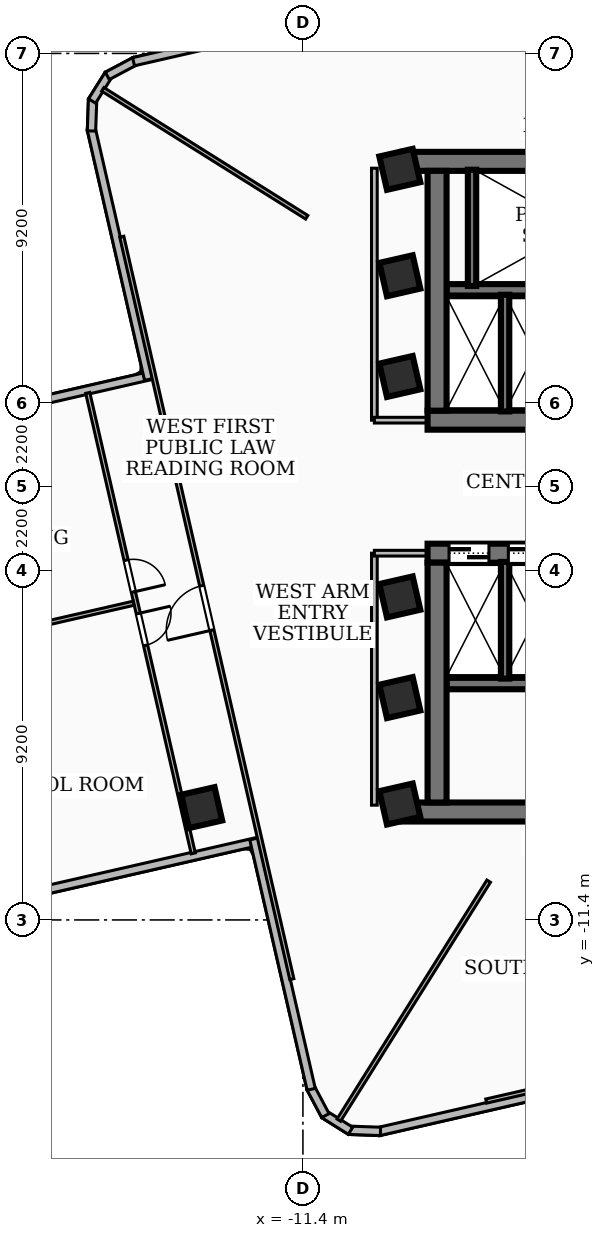
"""IFC4 building model, lengths in metres.
Left out: names, types, materials, properties, quantities, classifications, styles, units other than length and angle.
Written with IfcOpenShell. Run it as: python <this file> out.ifc"""

import sys

from ifc_helpers import new_model, si_unit, direction, frame, frame_2d, origin, origin_2d, place, context, subcontext, project, spatial, rectangle, extrude, element, fill, save


model = new_model("IFC4")
c1 = context("Model", 3, precision=1e-05, world=origin(), true_north=direction((0.0, 1.0)))
c2 = subcontext(c1, "Body", "Model", "MODEL_VIEW")
j1 = project(units=[si_unit("LENGTHUNIT", "METRE"), si_unit("PLANEANGLEUNIT", "RADIAN")], contexts=[c1])
p1 = place(None, origin())
s1 = spatial("IfcSite", under=j1, at=p1, CompositionType="ELEMENT")
p2 = place(p1, origin())
s2 = spatial("IfcBuilding", under=s1, at=p2, CompositionType="ELEMENT")
p3 = place(p2, frame((0.0, 0.0, 119.88)))
s3 = spatial("IfcBuildingStorey", under=s2, at=p3, CompositionType="ELEMENT", Elevation=119.88)
p4 = place(p3, frame((-8.78, 8.56, 0.0), z_axis=(0.0, 0.0, 1.0), x_axis=(1.0, 0.0, 0.0)))
e1 = element("IfcWall", 1, at=p4, inside=s3, PredefinedType="SHEAR", context=c2, shape_type="SweptSolid", body=[
    extrude(rectangle(XDim=17.56, YDim=0.5, at=frame_2d((8.78, 0.0))), origin(), (0.0, 0.0, 1.0), 3.34),
])
p5 = place(p3, frame((8.12, 1.75, 0.0), z_axis=(0.0, 0.0, 1.0), x_axis=(-1.0, 0.0, 0.0)))
e2 = element("IfcWall", 2, at=p5, inside=s3, PredefinedType="SHEAR", context=c2, shape_type="SweptSolid", body=[
    extrude(rectangle(XDim=16.24, YDim=0.5, at=frame_2d((8.12, 0.0))), origin(), (0.0, 0.0, 1.0), 3.34),
])
p6 = place(p5, frame((7.45, 0.0, 0.0)))
e3 = element("IfcOpeningElement", 3, at=p6, cuts=e2, PredefinedType="OPENING", context=c2, shape_type="SweptSolid", body=[
    extrude(rectangle(XDim=1.0, YDim=2.1, at=frame_2d((0.5, 1.05))), frame((0.0, 0.26, 0.0), z_axis=(0.0, -1.0, 0.0), x_axis=(1.0, 0.0, 0.0)), (0.0, 0.0, 1.0), 0.52),
])
p7 = place(p5, frame((3.4, 0.0, 0.0)))
e4 = element("IfcOpeningElement", 4, at=p7, cuts=e2, PredefinedType="OPENING", context=c2, shape_type="SweptSolid", body=[
    extrude(rectangle(XDim=0.9, YDim=2.06, at=frame_2d((0.45, 1.03))), frame((0.0, 0.26, 0.0), z_axis=(0.0, -1.0, 0.0), x_axis=(1.0, 0.0, 0.0)), (0.0, 0.0, 1.0), 0.52),
])
p8 = place(p5, frame((1.1, 0.0, 0.0)))
e5 = element("IfcOpeningElement", 5, at=p8, cuts=e2, PredefinedType="OPENING", context=c2, shape_type="SweptSolid", body=[
    extrude(rectangle(XDim=0.9, YDim=2.06, at=frame_2d((0.45, 1.03))), frame((0.0, 0.26, 0.0), z_axis=(0.0, -1.0, 0.0), x_axis=(1.0, 0.0, 0.0)), (0.0, 0.0, 1.0), 0.52),
])
p9 = place(p3, frame((-7.87, 2.0, 0.0), z_axis=(0.0, 0.0, 1.0), x_axis=(0.0, 1.0, 0.0)))
e6 = element("IfcWall", 6, at=p9, inside=s3, PredefinedType="SHEAR", context=c2, shape_type="SweptSolid", body=[
    extrude(rectangle(XDim=6.31, YDim=0.5, at=frame_2d((3.155, 0.0))), origin(), (0.0, 0.0, 1.0), 3.34),
])
p10 = place(p3, frame((7.62, 5.18, 0.0), z_axis=(0.0, 0.0, 1.0), x_axis=(-1.0, 0.0, 0.0)))
e7 = element("IfcWall", 7, at=p10, inside=s3, PredefinedType="SOLIDWALL", context=c2, shape_type="SweptSolid", body=[
    extrude(rectangle(XDim=15.24, YDim=0.3, at=frame_2d((7.62, 0.0))), origin(), (0.0, 0.0, 1.0), 3.34),
])
p11 = place(p10, frame((5.77, 0.0, 0.0)))
e8 = element("IfcOpeningElement", 8, at=p11, cuts=e7, PredefinedType="OPENING", context=c2, shape_type="SweptSolid", body=[
    extrude(rectangle(XDim=1.1, YDim=2.15, at=frame_2d((0.55, 1.075))), frame((0.0, 0.16, 0.0), z_axis=(0.0, -1.0, 0.0), x_axis=(1.0, 0.0, 0.0)), (0.0, 0.0, 1.0), 0.32),
])
p12 = place(p10, frame((2.97, 0.0, 0.0)))
e9 = element("IfcOpeningElement", 9, at=p12, cuts=e7, PredefinedType="OPENING", context=c2, shape_type="SweptSolid", body=[
    extrude(rectangle(XDim=1.1, YDim=2.15, at=frame_2d((0.55, 1.075))), frame((0.0, 0.16, 0.0), z_axis=(0.0, -1.0, 0.0), x_axis=(1.0, 0.0, 0.0)), (0.0, 0.0, 1.0), 0.32),
])
p13 = place(p10, frame((7.97, 0.0, 0.0)))
e10 = element("IfcOpeningElement", 10, at=p13, cuts=e7, PredefinedType="OPENING", context=c2, shape_type="SweptSolid", body=[
    extrude(rectangle(XDim=1.0, YDim=2.1, at=frame_2d((0.5, 1.05))), frame((0.0, 0.16, 0.0), z_axis=(0.0, -1.0, 0.0), x_axis=(1.0, 0.0, 0.0)), (0.0, 0.0, 1.0), 0.32),
])
p14 = place(p3, frame((8.78, -8.56, 0.0), z_axis=(0.0, 0.0, 1.0), x_axis=(-1.0, 0.0, 0.0)))
e11 = element("IfcWall", 11, at=p14, inside=s3, PredefinedType="SHEAR", context=c2, shape_type="SweptSolid", body=[
    extrude(rectangle(XDim=17.56, YDim=0.5, at=frame_2d((8.78, 0.0))), origin(), (0.0, 0.0, 1.0), 3.34),
])
p15 = place(p3, frame((-8.12, -1.75, 0.0), z_axis=(0.0, 0.0, 1.0), x_axis=(1.0, 0.0, 0.0)))
e12 = element("IfcWall", 12, at=p15, inside=s3, PredefinedType="SHEAR", context=c2, shape_type="SweptSolid", body=[
    extrude(rectangle(XDim=16.24, YDim=0.5, at=frame_2d((8.12, 0.0))), origin(), (0.0, 0.0, 1.0), 3.34),
])
p16 = place(p15, frame((7.45, 0.0, 0.0)))
e13 = element("IfcOpeningElement", 13, at=p16, cuts=e12, PredefinedType="OPENING", context=c2, shape_type="SweptSolid", body=[
    extrude(rectangle(XDim=1.0, YDim=2.1, at=frame_2d((0.5, 1.05))), frame((0.0, 0.26, 0.0), z_axis=(0.0, -1.0, 0.0), x_axis=(1.0, 0.0, 0.0)), (0.0, 0.0, 1.0), 0.52),
])
p17 = place(p15, frame((12.65, 0.0, 0.0)))
e14 = element("IfcOpeningElement", 14, at=p17, cuts=e12, PredefinedType="OPENING", context=c2, shape_type="SweptSolid", body=[
    extrude(rectangle(XDim=0.9, YDim=2.06, at=frame_2d((0.45, 1.03))), frame((0.0, 0.26, 0.0), z_axis=(0.0, -1.0, 0.0), x_axis=(1.0, 0.0, 0.0)), (0.0, 0.0, 1.0), 0.52),
])
p18 = place(p15, frame((0.565, 0.0, 0.0)))
e15 = element("IfcOpeningElement", 15, at=p18, cuts=e12, PredefinedType="OPENING", context=c2, shape_type="SweptSolid", body=[
    extrude(rectangle(XDim=1.05, YDim=2.15, at=frame_2d((0.525, 1.075))), frame((0.0, 0.26, 0.0), z_axis=(0.0, -1.0, 0.0), x_axis=(1.0, 0.0, 0.0)), (0.0, 0.0, 1.0), 0.52),
])
p19 = place(p15, frame((2.125, 0.0, 0.0)))
e16 = element("IfcOpeningElement", 16, at=p19, cuts=e12, PredefinedType="OPENING", context=c2, shape_type="SweptSolid", body=[
    extrude(rectangle(XDim=1.05, YDim=2.15, at=frame_2d((0.525, 1.075))), frame((0.0, 0.26, 0.0), z_axis=(0.0, -1.0, 0.0), x_axis=(1.0, 0.0, 0.0)), (0.0, 0.0, 1.0), 0.52),
])
p20 = place(p15, frame((3.685, 0.0, 0.0)))
e17 = element("IfcOpeningElement", 17, at=p20, cuts=e12, PredefinedType="OPENING", context=c2, shape_type="SweptSolid", body=[
    extrude(rectangle(XDim=1.05, YDim=2.15, at=frame_2d((0.525, 1.075))), frame((0.0, 0.26, 0.0), z_axis=(0.0, -1.0, 0.0), x_axis=(1.0, 0.0, 0.0)), (0.0, 0.0, 1.0), 0.52),
])
p21 = place(p3, frame((-7.87, -8.31, 0.0), z_axis=(0.0, 0.0, 1.0), x_axis=(0.0, 1.0, 0.0)))
e18 = element("IfcWall", 18, at=p21, inside=s3, PredefinedType="SHEAR", context=c2, shape_type="SweptSolid", body=[
    extrude(rectangle(XDim=6.31, YDim=0.5, at=frame_2d((3.155, 0.0))), origin(), (0.0, 0.0, 1.0), 3.34),
])
p22 = place(p3, frame((-7.62, -5.18, 0.0), z_axis=(0.0, 0.0, 1.0), x_axis=(1.0, 0.0, 0.0)))
e19 = element("IfcWall", 19, at=p22, inside=s3, PredefinedType="SOLIDWALL", context=c2, shape_type="SweptSolid", body=[
    extrude(rectangle(XDim=15.24, YDim=0.3, at=frame_2d((7.62, 0.0))), origin(), (0.0, 0.0, 1.0), 3.34),
])
p23 = place(p22, frame((5.77, 0.0, 0.0)))
e20 = element("IfcOpeningElement", 20, at=p23, cuts=e19, PredefinedType="OPENING", context=c2, shape_type="SweptSolid", body=[
    extrude(rectangle(XDim=1.1, YDim=2.15, at=frame_2d((0.55, 1.075))), frame((0.0, 0.16, 0.0), z_axis=(0.0, -1.0, 0.0), x_axis=(1.0, 0.0, 0.0)), (0.0, 0.0, 1.0), 0.32),
])
p24 = place(p22, frame((7.97, 0.0, 0.0)))
e21 = element("IfcOpeningElement", 21, at=p24, cuts=e19, PredefinedType="OPENING", context=c2, shape_type="SweptSolid", body=[
    extrude(rectangle(XDim=1.0, YDim=2.1, at=frame_2d((0.5, 1.05))), frame((0.0, 0.16, 0.0), z_axis=(0.0, -1.0, 0.0), x_axis=(1.0, 0.0, 0.0)), (0.0, 0.0, 1.0), 0.32),
])
p25 = place(p3, frame((-6.95, 5.28, 0.0), z_axis=(0.0, 0.0, 1.0), x_axis=(0.0, 1.0, 0.0)))
e22 = element("IfcWall", 22, at=p25, inside=s3, PredefinedType="SOLIDWALL", context=c2, shape_type="SweptSolid", body=[
    extrude(rectangle(XDim=3.06, YDim=0.22, at=frame_2d((1.53, 0.0))), origin(), (0.0, 0.0, 1.0), 3.34),
])
for number, where, z_axis, x_axis in (
    (23, (-6.08, 1.98, 0.0), (0.0, 0.0, 1.0), (0.0, 1.0, 0.0)),
    (24, (-6.08, -5.05, 0.0), (0.0, 0.0, 1.0), (0.0, 1.0, 0.0)),
):
    element("IfcWall", number, at=place(p3, frame(where, z_axis=z_axis, x_axis=x_axis)), inside=s3, PredefinedType="SOLIDWALL", context=c2, shape_type="SweptSolid", body=[
        extrude(rectangle(XDim=3.07, YDim=0.22, at=frame_2d((1.535, 0.0))), origin(), (0.0, 0.0, 1.0), 3.34),
    ])
for number, where, z_axis, x_axis in (
    (25, (-8.85, -5.55, 0.0), (0.0, 0.0, 1.0), (0.975, 0.223, 0.0)),
    (26, (-8.85, -2.9, 0.0), (0.0, 0.0, 1.0), (0.975, 0.223, 0.0)),
    (27, (-8.85, 2.9, 0.0), (0.0, 0.0, 1.0), (0.975, 0.223, 0.0)),
    (28, (-8.85, 5.55, 0.0), (0.0, 0.0, 1.0), (0.975, 0.223, 0.0)),
    (29, (-8.85, 8.35, 0.0), (0.0, 0.0, 1.0), (0.975, 0.223, 0.0)),
    (30, (-8.85, -8.35, 0.0), (0.0, 0.0, 1.0), (0.975, 0.223, 0.0)),
    (31, (-14.064, -8.445, 0.0), (0.0, 0.0, 1.0), (0.975, 0.223, 0.0)),
):
    element("IfcColumn", number, at=place(p3, frame(where, z_axis=z_axis, x_axis=x_axis)), inside=s3, PredefinedType="COLUMN", context=c2, shape_type="SweptSolid", body=[
        extrude(rectangle(XDim=0.9, YDim=0.9, at=origin_2d()), origin(), (0.0, 0.0, 1.0), 3.6),
    ])
p26 = place(p3, frame((-12.585, -9.335, 0.0), z_axis=(0.0, 0.0, 1.0), x_axis=(-0.974754036658, -0.223281365141, 0.0)))
e32 = element("IfcWall", 32, at=p26, inside=s3, PredefinedType="SOLIDWALL", context=c2, shape_type="SweptSolid", body=[
    extrude(rectangle(XDim=13.459, YDim=0.22, at=frame_2d((6.729, 0.0))), origin(), (0.0, 0.0, 1.0), 3.34),
])
p27 = place(p26, frame((9.659, 0.0, 0.85)))
e33 = element("IfcOpeningElement", 33, at=p27, cuts=e32, PredefinedType="OPENING", context=c2, shape_type="SweptSolid", body=[
    extrude(rectangle(XDim=2.7, YDim=1.85, at=frame_2d((1.35, 0.925))), frame((0.0, 0.12, 0.0), z_axis=(0.0, -1.0, 0.0), x_axis=(1.0, 0.0, 0.0)), (0.0, 0.0, 1.0), 0.24),
])
p28 = place(p3, frame((-28.512, -0.078, 0.0), z_axis=(0.0, 0.0, 1.0), x_axis=(0.974753462872, 0.223283870038, 0.0)))
e34 = element("IfcWall", 34, at=p28, inside=s3, PredefinedType="SOLIDWALL", context=c2, shape_type="SweptSolid", body=[
    extrude(rectangle(XDim=13.458, YDim=0.22, at=frame_2d((6.729, 0.0))), origin(), (0.0, 0.0, 1.0), 3.34),
])
p29 = place(p28, frame((1.1, 0.0, 0.85)))
e35 = element("IfcOpeningElement", 35, at=p29, cuts=e34, PredefinedType="OPENING", context=c2, shape_type="SweptSolid", body=[
    extrude(rectangle(XDim=1.5, YDim=1.8, at=frame_2d((0.75, 0.9))), frame((0.0, 0.12, 0.0), z_axis=(0.0, -1.0, 0.0), x_axis=(1.0, 0.0, 0.0)), (0.0, 0.0, 1.0), 0.24),
])
p30 = place(p3, frame((-15.46, 2.821, 0.0), z_axis=(0.0, 0.0, 1.0), x_axis=(-0.223278912438, 0.974754598481, 0.0)))
e36 = element("IfcWall", 36, at=p30, inside=s3, PredefinedType="SOLIDWALL", context=c2, shape_type="SweptSolid", body=[
    extrude(rectangle(XDim=6.759, YDim=0.22, at=frame_2d((3.379, 0.0))), origin(), (0.0, 0.0, 1.0), 3.34),
])
p31 = place(p3, frame((-16.964, 9.36, 0.0), z_axis=(0.0, 0.0, 1.0), x_axis=(0.035983706773, 0.999352376715, 0.0)))
e37 = element("IfcWall", 37, at=p31, inside=s3, PredefinedType="SOLIDWALL", context=c2, shape_type="SweptSolid", body=[
    extrude(rectangle(XDim=0.834, YDim=0.22, at=frame_2d((0.417, 0.0))), origin(), (0.0, 0.0, 1.0), 3.34),
])
p32 = place(p3, frame((-16.948, 10.148, 0.0), z_axis=(0.0, 0.0, 1.0), x_axis=(0.531096868492, 0.847311109497, 0.0)))
e38 = element("IfcWall", 38, at=p32, inside=s3, PredefinedType="SOLIDWALL", context=c2, shape_type="SweptSolid", body=[
    extrude(rectangle(XDim=0.819, YDim=0.22, at=frame_2d((0.41, 0.0))), origin(), (0.0, 0.0, 1.0), 3.34),
])
p33 = place(p3, frame((-16.548, 10.809, 0.0), z_axis=(0.0, 0.0, 1.0), x_axis=(0.883460266876, 0.468506090516, 0.0)))
e39 = element("IfcWall", 39, at=p33, inside=s3, PredefinedType="SOLIDWALL", context=c2, shape_type="SweptSolid", body=[
    extrude(rectangle(XDim=0.834, YDim=0.22, at=frame_2d((0.417, 0.0))), origin(), (0.0, 0.0, 1.0), 3.34),
])
p34 = place(p3, frame((-15.857, 11.182, 0.0), z_axis=(0.0, 0.0, 1.0), x_axis=(0.974754598481, 0.223278912438, 0.0)))
e40 = element("IfcWall", 40, at=p34, inside=s3, PredefinedType="SOLIDWALL", context=c2, shape_type="SweptSolid", body=[
    extrude(rectangle(XDim=6.759, YDim=0.22, at=frame_2d((3.379, 0.0))), origin(), (0.0, 0.0, 1.0), 3.34),
])
p35 = place(p3, frame((-2.821, -15.46, 0.0), z_axis=(0.0, 0.0, 1.0), x_axis=(-0.974754598481, -0.223278912438, 0.0)))
e41 = element("IfcWall", 41, at=p35, inside=s3, PredefinedType="SOLIDWALL", context=c2, shape_type="SweptSolid", body=[
    extrude(rectangle(XDim=6.759, YDim=0.22, at=frame_2d((3.379, 0.0))), origin(), (0.0, 0.0, 1.0), 2.57),
])
p36 = place(p3, frame((-9.36, -16.964, 0.0), z_axis=(0.0, 0.0, 1.0), x_axis=(-0.999352376715, 0.035983706773, 0.0)))
e42 = element("IfcWall", 42, at=p36, inside=s3, PredefinedType="SOLIDWALL", context=c2, shape_type="SweptSolid", body=[
    extrude(rectangle(XDim=0.834, YDim=0.22, at=frame_2d((0.417, 0.0))), origin(), (0.0, 0.0, 1.0), 3.34),
])
p37 = place(p3, frame((-10.148, -16.948, 0.0), z_axis=(0.0, 0.0, 1.0), x_axis=(-0.847311109497, 0.531096868492, 0.0)))
e43 = element("IfcWall", 43, at=p37, inside=s3, PredefinedType="SOLIDWALL", context=c2, shape_type="SweptSolid", body=[
    extrude(rectangle(XDim=0.819, YDim=0.22, at=frame_2d((0.41, 0.0))), origin(), (0.0, 0.0, 1.0), 3.34),
])
p38 = place(p3, frame((-10.809, -16.548, 0.0), z_axis=(0.0, 0.0, 1.0), x_axis=(-0.468506090516, 0.883460266876, 0.0)))
e44 = element("IfcWall", 44, at=p38, inside=s3, PredefinedType="SOLIDWALL", context=c2, shape_type="SweptSolid", body=[
    extrude(rectangle(XDim=0.834, YDim=0.22, at=frame_2d((0.417, 0.0))), origin(), (0.0, 0.0, 1.0), 3.34),
])
p39 = place(p3, frame((-11.182, -15.857, 0.0), z_axis=(0.0, 0.0, 1.0), x_axis=(-0.223278912438, 0.974754598481, 0.0)))
e45 = element("IfcWall", 45, at=p39, inside=s3, PredefinedType="SOLIDWALL", context=c2, shape_type="SweptSolid", body=[
    extrude(rectangle(XDim=6.759, YDim=0.22, at=frame_2d((3.379, 0.0))), origin(), (0.0, 0.0, 1.0), 3.34),
])
p40 = place(p3, frame((-9.52, 1.75, 0.0), z_axis=(0.0, 0.0, 1.0), x_axis=(0.0, 1.0, 0.0)))
e46 = element("IfcWall", 46, at=p40, inside=s3, PredefinedType="PARTITIONING", context=c2, shape_type="SweptSolid", body=[
    extrude(rectangle(XDim=6.63, YDim=0.15, at=frame_2d((3.315, 0.0))), origin(), (0.0, 0.0, 1.0), 2.57),
])
p41 = place(p3, frame((-7.85, 1.75, 0.0), z_axis=(0.0, 0.0, 1.0), x_axis=(-1.0, 0.0, 0.0)))
e47 = element("IfcWall", 47, at=p41, inside=s3, PredefinedType="PARTITIONING", context=c2, shape_type="SweptSolid", body=[
    extrude(rectangle(XDim=1.67, YDim=0.15, at=frame_2d((0.835, 0.0))), origin(), (0.0, 0.0, 1.0), 2.57),
])
p42 = place(p3, frame((-9.52, -8.38, 0.0), z_axis=(0.0, 0.0, 1.0), x_axis=(0.0, 1.0, 0.0)))
e48 = element("IfcWall", 48, at=p42, inside=s3, PredefinedType="PARTITIONING", context=c2, shape_type="SweptSolid", body=[
    extrude(rectangle(XDim=6.63, YDim=0.15, at=frame_2d((3.315, 0.0))), origin(), (0.0, 0.0, 1.0), 2.57),
])
p43 = place(p3, frame((-7.85, -1.75, 0.0), z_axis=(0.0, 0.0, 1.0), x_axis=(-1.0, 0.0, 0.0)))
e49 = element("IfcWall", 49, at=p43, inside=s3, PredefinedType="PARTITIONING", context=c2, shape_type="SweptSolid", body=[
    extrude(rectangle(XDim=1.67, YDim=0.15, at=frame_2d((0.835, 0.0))), origin(), (0.0, 0.0, 1.0), 2.57),
])
p44 = place(p3, frame((-11.3, 7.089, 0.0), z_axis=(0.0, 0.0, 1.0), x_axis=(-0.847172398776, 0.531318103167, 0.0)))
e50 = element("IfcWall", 50, at=p44, inside=s3, PredefinedType="PARTITIONING", context=c2, shape_type="SweptSolid", body=[
    extrude(rectangle(XDim=6.335, YDim=0.11, at=frame_2d((3.167, 0.0))), origin(), (0.0, 0.0, 1.0), 3.34),
])
p45 = place(p3, frame((-6.512, -10.38, 0.0), z_axis=(0.0, 0.0, 1.0), x_axis=(-0.531323053356, -0.847169294163, 0.0)))
e51 = element("IfcWall", 51, at=p45, inside=s3, PredefinedType="PARTITIONING", context=c2, shape_type="SweptSolid", body=[
    extrude(rectangle(XDim=7.421, YDim=0.11, at=frame_2d((3.711, 0.0))), origin(), (0.0, 0.0, 1.0), 2.57),
])
p46 = place(p3, frame((-11.692, -12.957, 0.0), z_axis=(0.0, 0.0, 1.0), x_axis=(-0.223262093598, 0.97475845088, 0.0)))
e52 = element("IfcWall", 52, at=p46, inside=s3, PredefinedType="PARTITIONING", context=c2, shape_type="SweptSolid", body=[
    extrude(rectangle(XDim=20.04, YDim=0.11, at=frame_2d((10.02, 0.0))), origin(), (0.0, 0.0, 1.0), 2.57),
])
p47 = place(p46, frame((9.42, 0.0, 0.0)))
e53 = element("IfcOpeningElement", 53, at=p47, cuts=e52, PredefinedType="OPENING", context=c2, shape_type="SweptSolid", body=[
    extrude(rectangle(XDim=1.2, YDim=2.1, at=frame_2d((0.6, 1.05))), frame((0.0, 0.065, 0.0), z_axis=(0.0, -1.0, 0.0), x_axis=(1.0, 0.0, 0.0)), (0.0, 0.0, 1.0), 0.13),
])
p48 = place(p3, frame((-15.855, -3.067, 0.0), z_axis=(0.0, 0.0, 1.0), x_axis=(-0.974758398925, -0.223262320434, 0.0)))
e54 = element("IfcWall", 54, at=p48, inside=s3, PredefinedType="PARTITIONING", context=c2, shape_type="SweptSolid", body=[
    extrude(rectangle(XDim=13.075, YDim=0.11, at=frame_2d((6.538, 0.0))), origin(), (0.0, 0.0, 1.0), 2.72),
])
p49 = place(p3, frame((-17.062, 2.468, 0.0), z_axis=(0.0, 0.0, 1.0), x_axis=(0.223341555051, -0.974740247341, 0.0)))
e55 = element("IfcWall", 55, at=p49, inside=s3, PredefinedType="PARTITIONING", context=c2, shape_type="SweptSolid", body=[
    extrude(rectangle(XDim=12.43, YDim=0.11, at=frame_2d((6.215, 0.0))), origin(), (0.0, 0.0, 1.0), 2.57),
])
p50 = place(p49, frame((4.515, 0.0, 0.0)))
e56 = element("IfcOpeningElement", 56, at=p50, cuts=e55, PredefinedType="OPENING", context=c2, shape_type="SweptSolid", body=[
    extrude(rectangle(XDim=0.86, YDim=2.04, at=frame_2d((0.43, 1.02))), frame((0.0, 0.065, 0.0), z_axis=(0.0, -1.0, 0.0), x_axis=(1.0, 0.0, 0.0)), (0.0, 0.0, 1.0), 0.13),
])
p51 = place(p49, frame((5.955, 0.0, 0.0)))
e57 = element("IfcOpeningElement", 57, at=p51, cuts=e55, PredefinedType="OPENING", context=c2, shape_type="SweptSolid", body=[
    extrude(rectangle(XDim=0.86, YDim=2.04, at=frame_2d((0.43, 1.02))), frame((0.0, 0.065, 0.0), z_axis=(0.0, -1.0, 0.0), x_axis=(1.0, 0.0, 0.0)), (0.0, 0.0, 1.0), 0.13),
])
p52 = place(p3, frame((12.957, -11.692, 0.0), z_axis=(0.0, 0.0, 1.0), x_axis=(-0.97475845088, -0.223262093598, 0.0)))
e58 = element("IfcWall", 58, at=p52, inside=s3, PredefinedType="PARTITIONING", context=c2, shape_type="SweptSolid", body=[
    extrude(rectangle(XDim=20.04, YDim=0.11, at=frame_2d((10.02, 0.0))), origin(), (0.0, 0.0, 1.0), 2.57),
])
p53 = place(p52, frame((9.42, 0.0, 0.0)))
e59 = element("IfcOpeningElement", 59, at=p53, cuts=e58, PredefinedType="OPENING", context=c2, shape_type="SweptSolid", body=[
    extrude(rectangle(XDim=1.2, YDim=2.1, at=frame_2d((0.6, 1.05))), frame((0.0, 0.065, 0.0), z_axis=(0.0, -1.0, 0.0), x_axis=(1.0, 0.0, 0.0)), (0.0, 0.0, 1.0), 0.13),
])
p54 = place(p18, origin())
e60 = element("IfcDoor", 60, at=p54, inside=s3, OperationType="DOUBLE_DOOR_SLIDING", PredefinedType="DOOR", context=c2, shape_type="SweptSolid", body=[
    extrude(rectangle(XDim=1.05, YDim=2.15, at=frame_2d((0.525, 1.075))), frame((0.0, 0.025, 0.0), z_axis=(0.0, -1.0, 0.0), x_axis=(1.0, 0.0, 0.0)), (0.0, 0.0, 1.0), 0.05),
])
fill(e15, e60)
p55 = place(p19, origin())
e61 = element("IfcDoor", 61, at=p55, inside=s3, OperationType="DOUBLE_DOOR_SLIDING", PredefinedType="DOOR", context=c2, shape_type="SweptSolid", body=[
    extrude(rectangle(XDim=1.05, YDim=2.15, at=frame_2d((0.525, 1.075))), frame((0.0, 0.025, 0.0), z_axis=(0.0, -1.0, 0.0), x_axis=(1.0, 0.0, 0.0)), (0.0, 0.0, 1.0), 0.05),
])
fill(e16, e61)
p56 = place(p47, origin())
e62 = element("IfcDoor", 62, at=p56, inside=s3, OperationType="SINGLE_SWING_LEFT", PredefinedType="DOOR", context=c2, shape_type="SweptSolid", body=[
    extrude(rectangle(XDim=1.2, YDim=2.1, at=frame_2d((0.6, 1.05))), frame((0.0, 0.025, 0.0), z_axis=(0.0, -1.0, 0.0), x_axis=(1.0, 0.0, 0.0)), (0.0, 0.0, 1.0), 0.05),
])
fill(e53, e62)
p57 = place(p50, origin())
e63 = element("IfcDoor", 63, at=p57, inside=s3, OperationType="SINGLE_SWING_RIGHT", PredefinedType="DOOR", context=c2, shape_type="SweptSolid", body=[
    extrude(rectangle(XDim=0.86, YDim=2.04, at=frame_2d((0.43, 1.02))), frame((0.0, 0.025, 0.0), z_axis=(0.0, -1.0, 0.0), x_axis=(1.0, 0.0, 0.0)), (0.0, 0.0, 1.0), 0.05),
])
fill(e56, e63)
p58 = place(p51, origin())
e64 = element("IfcDoor", 64, at=p58, inside=s3, OperationType="SINGLE_SWING_LEFT", PredefinedType="DOOR", context=c2, shape_type="SweptSolid", body=[
    extrude(rectangle(XDim=0.86, YDim=2.04, at=frame_2d((0.43, 1.02))), frame((0.0, 0.025, 0.0), z_axis=(0.0, -1.0, 0.0), x_axis=(1.0, 0.0, 0.0)), (0.0, 0.0, 1.0), 0.05),
])
fill(e57, e64)
save(model, sys.argv[1])
